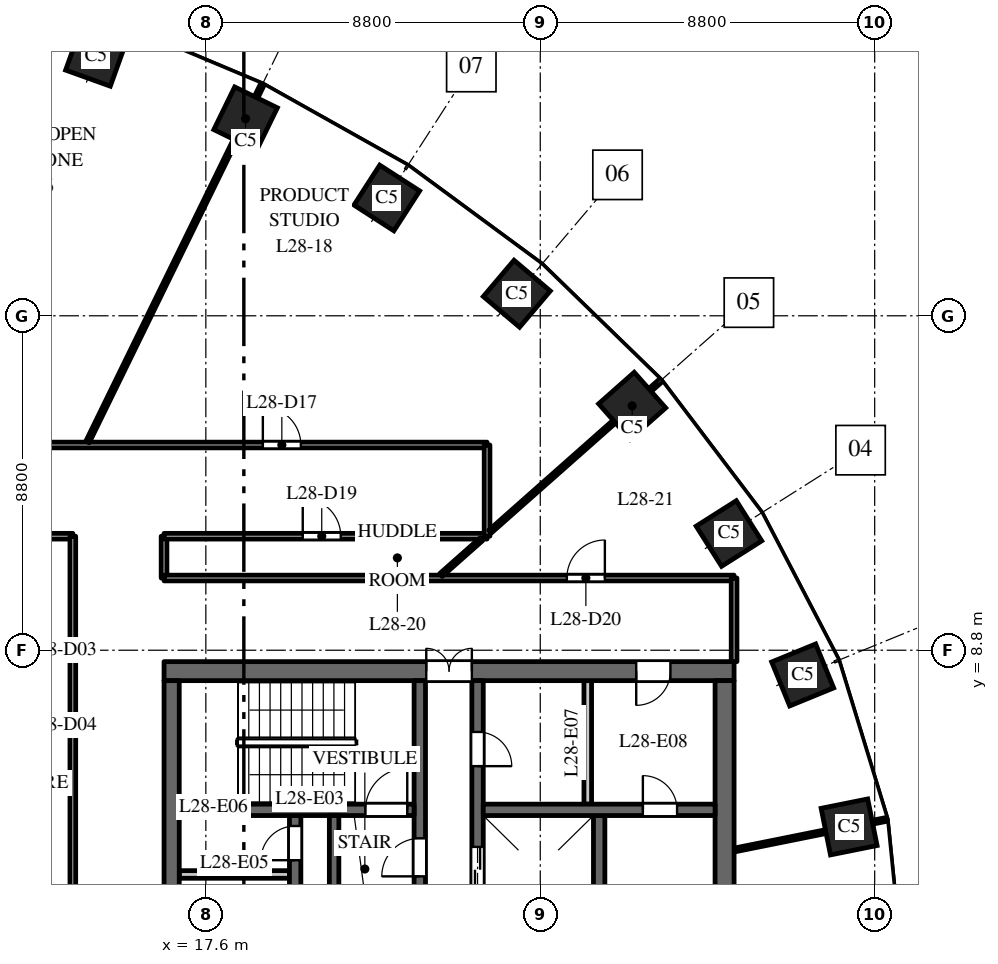
"""IFC4 building model, lengths in metres.
Left out: names, types, materials, properties, quantities, classifications, styles, units other than length and angle.
Written with IfcOpenShell. Run it as: python <this file> out.ifc"""

import sys

from ifc_helpers import new_model, si_unit, direction, frame, frame_2d, origin, origin_2d, place, context, subcontext, project, spatial, rectangle, extrude, element, fill, save


model = new_model("IFC4")
c1 = context("Model", 3, precision=1e-05, world=origin(), true_north=direction((0.0, 1.0)))
c2 = subcontext(c1, "Body", "Model", "MODEL_VIEW")
j1 = project(units=[si_unit("LENGTHUNIT", "METRE"), si_unit("PLANEANGLEUNIT", "RADIAN")], contexts=[c1])
p1 = place(None, origin())
s1 = spatial("IfcSite", under=j1, at=p1, CompositionType="ELEMENT")
p2 = place(p1, origin())
s2 = spatial("IfcBuilding", under=s1, at=p2, CompositionType="ELEMENT")
p3 = place(p2, frame((0.0, 0.0, 124.0)))
s3 = spatial("IfcBuildingStorey", under=s2, at=p3, CompositionType="ELEMENT", Elevation=124.0)
for number, where, z_axis, x_axis in (
    (1, (34.527, 4.151, 0.0), (0.0, 0.0, 1.0), (-0.197, 0.98, 0.0)),
    (2, (33.305, 8.149, 0.0), (0.0, 0.0, 1.0), (-0.379, 0.925, 0.0)),
    (3, (31.365, 11.871, 0.0), (0.0, 0.0, 1.0), (-0.535, 0.845, 0.0)),
    (4, (28.819, 15.23, 0.0), (0.0, 0.0, 1.0), (-0.663, 0.749, 0.0)),
    (5, (25.783, 18.18, 0.0), (0.0, 0.0, 1.0), (-0.763, 0.646, 0.0)),
    (6, (22.362, 20.7, 0.0), (0.0, 0.0, 1.0), (-0.84, 0.542, 0.0)),
    (7, (18.646, 22.785, 0.0), (0.0, 0.0, 1.0), (-0.898, 0.439, 0.0)),
    (8, (14.709, 24.441, 0.0), (0.0, 0.0, 1.0), (-0.941, 0.338, 0.0)),
):
    element("IfcColumn", number, at=place(p3, frame(where, z_axis=z_axis, x_axis=x_axis)), inside=s3, PredefinedType="COLUMN", context=c2, shape_type="SweptSolid", body=[
        extrude(rectangle(XDim=1.25, YDim=1.25, at=origin_2d()), origin(), (0.0, 0.0, 1.0), 4.0),
    ])
p4 = place(p3, frame((16.5, 8.25, 0.0), z_axis=(0.0, 0.0, 1.0), x_axis=(1.0, 0.0, 0.0)))
e9 = element("IfcWall", 9, at=p4, inside=s3, PredefinedType="SHEAR", context=c2, shape_type="SweptSolid", body=[
    extrude(rectangle(XDim=15.0, YDim=0.5, at=frame_2d((7.5, 0.0))), origin(), (0.0, 0.0, 1.0), 3.7),
])
p5 = place(p4, frame((6.9, 0.0, 0.0)))
e10 = element("IfcOpeningElement", 10, at=p5, cuts=e9, PredefinedType="OPENING", context=c2, shape_type="SweptSolid", body=[
    extrude(rectangle(XDim=1.2, YDim=2.1, at=frame_2d((0.6, 1.05))), frame((0.0, 0.26, 0.0), z_axis=(0.0, -1.0, 0.0), x_axis=(1.0, 0.0, 0.0)), (0.0, 0.0, 1.0), 0.52),
])
p6 = place(p4, frame((12.425, 0.0, 0.0)))
e11 = element("IfcOpeningElement", 11, at=p6, cuts=e9, PredefinedType="OPENING", context=c2, shape_type="SweptSolid", body=[
    extrude(rectangle(XDim=0.9, YDim=2.1, at=frame_2d((0.45, 1.05))), frame((0.0, 0.26, 0.0), z_axis=(0.0, -1.0, 0.0), x_axis=(1.0, 0.0, 0.0)), (0.0, 0.0, 1.0), 0.52),
])
p7 = place(p3, frame((16.9, 2.9, 0.0), z_axis=(0.0, 0.0, 1.0), x_axis=(1.0, 0.0, 0.0)))
e12 = element("IfcWall", 12, at=p7, inside=s3, PredefinedType="PARTITIONING", context=c2, shape_type="SweptSolid", body=[
    extrude(rectangle(XDim=2.9, YDim=0.2, at=frame_2d((1.45, 0.0))), origin(), (0.0, 0.0, 1.0), 3.7),
])
p8 = place(p3, frame((27.95, -4.45, 0.0), z_axis=(0.0, 0.0, 1.0), x_axis=(0.0, 1.0, 0.0)))
e13 = element("IfcWall", 13, at=p8, inside=s3, PredefinedType="SHEAR", context=c2, shape_type="SweptSolid", body=[
    extrude(rectangle(XDim=8.9, YDim=0.3, at=frame_2d((4.45, 0.0))), origin(), (0.0, 0.0, 1.0), 3.7),
])
p9 = place(p3, frame((19.95, -4.45, 0.0), z_axis=(0.0, 0.0, 1.0), x_axis=(0.0, 1.0, 0.0)))
e14 = element("IfcWall", 14, at=p9, inside=s3, PredefinedType="SHEAR", context=c2, shape_type="SweptSolid", body=[
    extrude(rectangle(XDim=8.9, YDim=0.3, at=frame_2d((4.45, 0.0))), origin(), (0.0, 0.0, 1.0), 3.7),
])
p10 = place(p9, frame((0.775, 0.0, 0.0)))
e15 = element("IfcOpeningElement", 15, at=p10, cuts=e14, PredefinedType="OPENING", context=c2, shape_type="SweptSolid", body=[
    extrude(rectangle(XDim=1.2, YDim=2.1, at=frame_2d((0.6, 1.05))), frame((0.0, 0.16, 0.0), z_axis=(0.0, -1.0, 0.0), x_axis=(1.0, 0.0, 0.0)), (0.0, 0.0, 1.0), 0.32),
])
p11 = place(p9, frame((4.62, 0.0, 0.0)))
e16 = element("IfcOpeningElement", 16, at=p11, cuts=e14, PredefinedType="OPENING", context=c2, shape_type="SweptSolid", body=[
    extrude(rectangle(XDim=0.9, YDim=2.1, at=frame_2d((0.45, 1.05))), frame((0.0, 0.16, 0.0), z_axis=(0.0, -1.0, 0.0), x_axis=(1.0, 0.0, 0.0)), (0.0, 0.0, 1.0), 0.32),
])
p12 = place(p9, frame((6.1, 0.0, 0.0)))
e17 = element("IfcOpeningElement", 17, at=p12, cuts=e14, PredefinedType="OPENING", context=c2, shape_type="SweptSolid", body=[
    extrude(rectangle(XDim=0.9, YDim=2.1, at=frame_2d((0.45, 1.05))), frame((0.0, 0.16, 0.0), z_axis=(0.0, -1.0, 0.0), x_axis=(1.0, 0.0, 0.0)), (0.0, 0.0, 1.0), 0.32),
])
p13 = place(p9, frame((7.725, 0.0, 0.0)))
e18 = element("IfcOpeningElement", 18, at=p13, cuts=e14, PredefinedType="OPENING", context=c2, shape_type="SweptSolid", body=[
    extrude(rectangle(XDim=0.9, YDim=2.1, at=frame_2d((0.45, 1.05))), frame((0.0, 0.16, 0.0), z_axis=(0.0, -1.0, 0.0), x_axis=(1.0, 0.0, 0.0)), (0.0, 0.0, 1.0), 0.32),
])
p14 = place(p3, frame((24.75, -8.0, 0.0), z_axis=(0.0, 0.0, 1.0), x_axis=(0.0, 1.0, 0.0)))
e19 = element("IfcWall", 19, at=p14, inside=s3, PredefinedType="SHEAR", context=c2, shape_type="SweptSolid", body=[
    extrude(rectangle(XDim=16.0, YDim=0.3, at=frame_2d((8.0, 0.0))), origin(), (0.0, 0.0, 1.0), 3.7),
])
p15 = place(p14, frame((4.425, 0.0, 0.0)))
e20 = element("IfcOpeningElement", 20, at=p15, cuts=e19, PredefinedType="OPENING", context=c2, shape_type="SweptSolid", body=[
    extrude(rectangle(XDim=1.1, YDim=2.1, at=frame_2d((0.55, 1.05))), frame((0.0, 0.16, 0.0), z_axis=(0.0, -1.0, 0.0), x_axis=(1.0, 0.0, 0.0)), (0.0, 0.0, 1.0), 0.32),
])
p16 = place(p14, frame((7.45, 0.0, 0.0)))
e21 = element("IfcOpeningElement", 21, at=p16, cuts=e19, PredefinedType="OPENING", context=c2, shape_type="SweptSolid", body=[
    extrude(rectangle(XDim=1.1, YDim=2.1, at=frame_2d((0.55, 1.05))), frame((0.0, 0.16, 0.0), z_axis=(0.0, -1.0, 0.0), x_axis=(1.0, 0.0, 0.0)), (0.0, 0.0, 1.0), 0.32),
])
p17 = place(p14, frame((10.425, 0.0, 0.0)))
e22 = element("IfcOpeningElement", 22, at=p17, cuts=e19, PredefinedType="OPENING", context=c2, shape_type="SweptSolid", body=[
    extrude(rectangle(XDim=1.2, YDim=2.1, at=frame_2d((0.6, 1.05))), frame((0.0, 0.16, 0.0), z_axis=(0.0, -1.0, 0.0), x_axis=(1.0, 0.0, 0.0)), (0.0, 0.0, 1.0), 0.32),
])
p18 = place(p14, frame((13.75, 0.0, 0.0)))
e23 = element("IfcOpeningElement", 23, at=p18, cuts=e19, PredefinedType="OPENING", context=c2, shape_type="SweptSolid", body=[
    extrude(rectangle(XDim=0.9, YDim=2.1, at=frame_2d((0.45, 1.05))), frame((0.0, 0.16, 0.0), z_axis=(0.0, -1.0, 0.0), x_axis=(1.0, 0.0, 0.0)), (0.0, 0.0, 1.0), 0.32),
])
p19 = place(p14, frame((1.35, 0.0, 0.0)))
e24 = element("IfcOpeningElement", 24, at=p19, cuts=e19, PredefinedType="OPENING", context=c2, shape_type="SweptSolid", body=[
    extrude(rectangle(XDim=0.9, YDim=2.1, at=frame_2d((0.45, 1.05))), frame((0.0, 0.16, 0.0), z_axis=(0.0, -1.0, 0.0), x_axis=(1.0, 0.0, 0.0)), (0.0, 0.0, 1.0), 0.32),
])
p20 = place(p3, frame((16.7, -8.0, 0.0), z_axis=(0.0, 0.0, 1.0), x_axis=(0.0, 1.0, 0.0)))
e25 = element("IfcWall", 25, at=p20, inside=s3, PredefinedType="SHEAR", context=c2, shape_type="SweptSolid", body=[
    extrude(rectangle(XDim=16.0, YDim=0.4, at=frame_2d((8.0, 0.0))), origin(), (0.0, 0.0, 1.0), 3.7),
])
p21 = place(p3, frame((31.25, -8.0, 0.0), z_axis=(0.0, 0.0, 1.0), x_axis=(0.0, 1.0, 0.0)))
e26 = element("IfcWall", 26, at=p21, inside=s3, PredefinedType="SHEAR", context=c2, shape_type="SweptSolid", body=[
    extrude(rectangle(XDim=16.0, YDim=0.5, at=frame_2d((8.0, 0.0))), origin(), (0.0, 0.0, 1.0), 3.7),
])
p22 = place(p3, frame((24.9, 4.6, 0.0), z_axis=(0.0, 0.0, 1.0), x_axis=(1.0, 0.0, 0.0)))
e27 = element("IfcWall", 27, at=p22, inside=s3, PredefinedType="SHEAR", context=c2, shape_type="SweptSolid", body=[
    extrude(rectangle(XDim=6.1, YDim=0.3, at=frame_2d((3.05, 0.0))), origin(), (0.0, 0.0, 1.0), 3.7),
])
p23 = place(p22, frame((4.2, 0.0, 0.0)))
e28 = element("IfcOpeningElement", 28, at=p23, cuts=e27, PredefinedType="OPENING", context=c2, shape_type="SweptSolid", body=[
    extrude(rectangle(XDim=0.9, YDim=2.1, at=frame_2d((0.45, 1.05))), frame((0.0, 0.16, 0.0), z_axis=(0.0, -1.0, 0.0), x_axis=(1.0, 0.0, 0.0)), (0.0, 0.0, 1.0), 0.32),
])
p24 = place(p3, frame((27.65, 4.75, 0.0), z_axis=(0.0, 0.0, 1.0), x_axis=(0.0, 1.0, 0.0)))
e29 = element("IfcWall", 29, at=p24, inside=s3, PredefinedType="PARTITIONING", context=c2, shape_type="SweptSolid", body=[
    extrude(rectangle(XDim=3.25, YDim=0.2, at=frame_2d((1.625, 0.0))), origin(), (0.0, 0.0, 1.0), 3.7),
])
p25 = place(p3, frame((23.23, 2.25, 0.0), z_axis=(0.0, 0.0, 1.0), x_axis=(0.0, 1.0, 0.0)))
e30 = element("IfcWall", 30, at=p25, inside=s3, PredefinedType="SHEAR", context=c2, shape_type="SweptSolid", body=[
    extrude(rectangle(XDim=5.75, YDim=0.3, at=frame_2d((2.875, 0.0))), origin(), (0.0, 0.0, 1.0), 3.7),
])
p26 = place(p25, frame((0.6, 0.0, 0.0)))
e31 = element("IfcOpeningElement", 31, at=p26, cuts=e30, PredefinedType="OPENING", context=c2, shape_type="SweptSolid", body=[
    extrude(rectangle(XDim=1.0, YDim=2.1, at=frame_2d((0.5, 1.05))), frame((0.0, 0.16, 0.0), z_axis=(0.0, -1.0, 0.0), x_axis=(1.0, 0.0, 0.0)), (0.0, 0.0, 1.0), 0.32),
])
p27 = place(p3, frame((16.9, 4.6, 0.0), z_axis=(0.0, 0.0, 1.0), x_axis=(1.0, 0.0, 0.0)))
e32 = element("IfcWall", 32, at=p27, inside=s3, PredefinedType="SHEAR", context=c2, shape_type="SweptSolid", body=[
    extrude(rectangle(XDim=6.18, YDim=0.3, at=frame_2d((3.09, 0.0))), origin(), (0.0, 0.0, 1.0), 3.7),
])
p28 = place(p27, frame((4.9, 0.0, 0.0)))
e33 = element("IfcOpeningElement", 33, at=p28, cuts=e32, PredefinedType="OPENING", context=c2, shape_type="SweptSolid", body=[
    extrude(rectangle(XDim=1.1, YDim=2.1, at=frame_2d((0.55, 1.05))), frame((0.0, 0.16, 0.0), z_axis=(0.0, -1.0, 0.0), x_axis=(1.0, 0.0, 0.0)), (0.0, 0.0, 1.0), 0.32),
])
p29 = place(p3, frame((20.975, 2.25, 0.0), z_axis=(0.0, 0.0, 1.0), x_axis=(0.0, 1.0, 0.0)))
e34 = element("IfcWall", 34, at=p29, inside=s3, PredefinedType="SHEAR", context=c2, shape_type="SweptSolid", body=[
    extrude(rectangle(XDim=2.2, YDim=0.25, at=frame_2d((1.1, 0.0))), origin(), (0.0, 0.0, 1.0), 3.7),
])
p30 = place(p3, frame((0.764, 14.2, 0.0), z_axis=(0.0, 0.0, 1.0), x_axis=(1.0, 0.0, 0.0)))
e35 = element("IfcWall", 35, at=p30, inside=s3, PredefinedType="PARTITIONING", context=c2, shape_type="SweptSolid", body=[
    extrude(rectangle(XDim=24.236, YDim=0.15, at=frame_2d((12.118, 0.0))), origin(), (0.0, 0.0, 1.0), 2.85),
])
p31 = place(p30, frame((6.294, 0.0, 0.0)))
e36 = element("IfcOpeningElement", 36, at=p31, cuts=e35, PredefinedType="OPENING", context=c2, shape_type="SweptSolid", body=[
    extrude(rectangle(XDim=1.0, YDim=2.1, at=frame_2d((0.5, 1.05))), frame((0.0, 0.085, 0.0), z_axis=(0.0, -1.0, 0.0), x_axis=(1.0, 0.0, 0.0)), (0.0, 0.0, 1.0), 0.17),
])
p32 = place(p30, frame((18.336, 0.0, 0.0)))
e37 = element("IfcOpeningElement", 37, at=p32, cuts=e35, PredefinedType="OPENING", context=c2, shape_type="SweptSolid", body=[
    extrude(rectangle(XDim=1.0, YDim=2.1, at=frame_2d((0.5, 1.05))), frame((0.0, 0.085, 0.0), z_axis=(0.0, -1.0, 0.0), x_axis=(1.0, 0.0, 0.0)), (0.0, 0.0, 1.0), 0.17),
])
p33 = place(p3, frame((8.93, 11.8, 0.0), z_axis=(0.0, 0.0, 1.0), x_axis=(1.0, 0.0, 0.0)))
e38 = element("IfcWall", 38, at=p33, inside=s3, PredefinedType="PARTITIONING", context=c2, shape_type="SweptSolid", body=[
    extrude(rectangle(XDim=5.17, YDim=0.15, at=frame_2d((2.585, 0.0))), origin(), (0.0, 0.0, 1.0), 3.7),
])
p34 = place(p3, frame((14.1, -11.8, 0.0), z_axis=(0.0, 0.0, 1.0), x_axis=(0.0, 1.0, 0.0)))
e39 = element("IfcWall", 39, at=p34, inside=s3, PredefinedType="PARTITIONING", context=c2, shape_type="SweptSolid", body=[
    extrude(rectangle(XDim=23.6, YDim=0.15, at=frame_2d((11.8, 0.0))), origin(), (0.0, 0.0, 1.0), 2.75),
])
p35 = place(p34, frame((11.2, 0.0, 0.0)))
e40 = element("IfcOpeningElement", 40, at=p35, cuts=e39, PredefinedType="OPENING", context=c2, shape_type="SweptSolid", body=[
    extrude(rectangle(XDim=1.0, YDim=2.1, at=frame_2d((0.5, 1.05))), frame((0.0, 0.085, 0.0), z_axis=(0.0, -1.0, 0.0), x_axis=(1.0, 0.0, 0.0)), (0.0, 0.0, 1.0), 0.17),
])
p36 = place(p3, frame((14.487, 14.279, 0.0), z_axis=(0.0, 0.0, 1.0), x_axis=(0.439239825182, 0.898369843647, 0.0)))
e41 = element("IfcWall", 41, at=p36, inside=s3, PredefinedType="PARTITIONING", context=c2, shape_type="SweptSolid", body=[
    extrude(rectangle(XDim=10.47, YDim=0.1, at=frame_2d((5.235, 0.0))), origin(), (0.0, 0.0, 1.0), 2.9),
])
p37 = place(p3, frame((16.5, 10.7, 0.0), z_axis=(0.0, 0.0, 1.0), x_axis=(0.0, 1.0, 0.0)))
e42 = element("IfcWall", 42, at=p37, inside=s3, PredefinedType="PARTITIONING", context=c2, shape_type="SweptSolid", body=[
    extrude(rectangle(XDim=1.1, YDim=0.15, at=frame_2d((0.55, 0.0))), origin(), (0.0, 0.0, 1.0), 3.7),
])
p38 = place(p3, frame((16.5, 10.7, 0.0), z_axis=(0.0, 0.0, 1.0), x_axis=(1.0, 0.0, 0.0)))
e43 = element("IfcWall", 43, at=p38, inside=s3, PredefinedType="PARTITIONING", context=c2, shape_type="SweptSolid", body=[
    extrude(rectangle(XDim=15.0, YDim=0.15, at=frame_2d((7.5, 0.0))), origin(), (0.0, 0.0, 1.0), 2.75),
])
p39 = place(p38, frame((10.6, 0.0, 0.0)))
e44 = element("IfcOpeningElement", 44, at=p39, cuts=e43, PredefinedType="OPENING", context=c2, shape_type="SweptSolid", body=[
    extrude(rectangle(XDim=1.0, YDim=2.1, at=frame_2d((0.5, 1.05))), frame((0.0, 0.085, 0.0), z_axis=(0.0, -1.0, 0.0), x_axis=(1.0, 0.0, 0.0)), (0.0, 0.0, 1.0), 0.17),
])
p40 = place(p3, frame((16.5, 11.8, 0.0), z_axis=(0.0, 0.0, 1.0), x_axis=(1.0, 0.0, 0.0)))
e45 = element("IfcWall", 45, at=p40, inside=s3, PredefinedType="PARTITIONING", context=c2, shape_type="SweptSolid", body=[
    extrude(rectangle(XDim=8.5, YDim=0.15, at=frame_2d((4.25, 0.0))), origin(), (0.0, 0.0, 1.0), 2.75),
])
p41 = place(p40, frame((3.65, 0.0, 0.0)))
e46 = element("IfcOpeningElement", 46, at=p41, cuts=e45, PredefinedType="OPENING", context=c2, shape_type="SweptSolid", body=[
    extrude(rectangle(XDim=1.0, YDim=2.1, at=frame_2d((0.5, 1.05))), frame((0.0, 0.085, 0.0), z_axis=(0.0, -1.0, 0.0), x_axis=(1.0, 0.0, 0.0)), (0.0, 0.0, 1.0), 0.17),
])
p42 = place(p3, frame((23.785, 10.778, 0.0), z_axis=(0.0, 0.0, 1.0), x_axis=(0.749052165765, 0.662511021013, 0.0)))
e47 = element("IfcWall", 47, at=p42, inside=s3, PredefinedType="PARTITIONING", context=c2, shape_type="SweptSolid", body=[
    extrude(rectangle(XDim=1.425, YDim=0.1, at=frame_2d((0.712, 0.0))), origin(), (0.0, 0.0, 1.0), 3.7),
])
p43 = place(p3, frame((25.0, 11.8, 0.0), z_axis=(0.0, 0.0, 1.0), x_axis=(0.0, 1.0, 0.0)))
e48 = element("IfcWall", 48, at=p43, inside=s3, PredefinedType="PARTITIONING", context=c2, shape_type="SweptSolid", body=[
    extrude(rectangle(XDim=2.4, YDim=0.15, at=frame_2d((1.2, 0.0))), origin(), (0.0, 0.0, 1.0), 2.75),
])
p44 = place(p3, frame((25.078, 11.921, 0.0), z_axis=(0.0, 0.0, 1.0), x_axis=(0.748903310324, 0.662679282749, 0.0)))
e49 = element("IfcWall", 49, at=p44, inside=s3, PredefinedType="PARTITIONING", context=c2, shape_type="SweptSolid", body=[
    extrude(rectangle(XDim=5.997, YDim=0.1, at=frame_2d((2.999, 0.0))), origin(), (0.0, 0.0, 1.0), 3.7),
])
p45 = place(p3, frame((31.5, 3.542, 0.0), z_axis=(0.0, 0.0, 1.0), x_axis=(0.980357474535, 0.197228857227, 0.0)))
e50 = element("IfcWall", 50, at=p45, inside=s3, PredefinedType="PARTITIONING", context=c2, shape_type="SweptSolid", body=[
    extrude(rectangle(XDim=4.092, YDim=0.1, at=frame_2d((2.046, 0.0))), origin(), (0.0, 0.0, 1.0), 2.9),
])
p46 = place(p3, frame((31.5, 8.5, 0.0), z_axis=(0.0, 0.0, 1.0), x_axis=(0.0, 1.0, 0.0)))
e51 = element("IfcWall", 51, at=p46, inside=s3, PredefinedType="PARTITIONING", context=c2, shape_type="SweptSolid", body=[
    extrude(rectangle(XDim=2.2, YDim=0.15, at=frame_2d((1.1, 0.0))), origin(), (0.0, 0.0, 1.0), 2.9),
])
p47 = place(p17, origin())
e52 = element("IfcDoor", 52, at=p47, inside=s3, OperationType="DOUBLE_DOOR_SLIDING", PredefinedType="DOOR", context=c2, shape_type="SweptSolid", body=[
    extrude(rectangle(XDim=1.2, YDim=2.1, at=frame_2d((0.6, 1.05))), frame((0.0, 0.025, 0.0), z_axis=(0.0, -1.0, 0.0), x_axis=(1.0, 0.0, 0.0)), (0.0, 0.0, 1.0), 0.05),
])
fill(e22, e52)
p48 = place(p28, origin())
e53 = element("IfcDoor", 53, at=p48, inside=s3, OperationType="SINGLE_SWING_LEFT", PredefinedType="DOOR", context=c2, shape_type="SweptSolid", body=[
    extrude(rectangle(XDim=1.1, YDim=2.1, at=frame_2d((0.55, 1.05))), frame((0.0, 0.025, 0.0), z_axis=(0.0, -1.0, 0.0), x_axis=(1.0, 0.0, 0.0)), (0.0, 0.0, 1.0), 0.05),
])
fill(e33, e53)
p49 = place(p26, origin())
e54 = element("IfcDoor", 54, at=p49, inside=s3, OperationType="SINGLE_SWING_RIGHT", PredefinedType="DOOR", context=c2, shape_type="SweptSolid", body=[
    extrude(rectangle(XDim=1.0, YDim=2.1, at=frame_2d((0.5, 1.05))), frame((0.0, 0.025, 0.0), z_axis=(0.0, -1.0, 0.0), x_axis=(1.0, 0.0, 0.0)), (0.0, 0.0, 1.0), 0.05),
])
fill(e31, e54)
p50 = place(p5, origin())
e55 = element("IfcDoor", 55, at=p50, inside=s3, OperationType="DOUBLE_DOOR_DOUBLE_SWING", PredefinedType="DOOR", context=c2, shape_type="SweptSolid", body=[
    extrude(rectangle(XDim=1.2, YDim=2.1, at=frame_2d((0.6, 1.05))), frame((0.0, 0.025, 0.0), z_axis=(0.0, -1.0, 0.0), x_axis=(1.0, 0.0, 0.0)), (0.0, 0.0, 1.0), 0.05),
])
fill(e10, e55)
p51 = place(p13, origin())
e56 = element("IfcDoor", 56, at=p51, inside=s3, OperationType="SINGLE_SWING_RIGHT", PredefinedType="DOOR", context=c2, shape_type="SweptSolid", body=[
    extrude(rectangle(XDim=0.9, YDim=2.1, at=frame_2d((0.45, 1.05))), frame((0.0, 0.025, 0.0), z_axis=(0.0, -1.0, 0.0), x_axis=(1.0, 0.0, 0.0)), (0.0, 0.0, 1.0), 0.05),
])
fill(e18, e56)
p52 = place(p18, origin())
e57 = element("IfcDoor", 57, at=p52, inside=s3, OperationType="SINGLE_SWING_LEFT", PredefinedType="DOOR", context=c2, shape_type="SweptSolid", body=[
    extrude(rectangle(XDim=0.9, YDim=2.1, at=frame_2d((0.45, 1.05))), frame((0.0, 0.025, 0.0), z_axis=(0.0, -1.0, 0.0), x_axis=(1.0, 0.0, 0.0)), (0.0, 0.0, 1.0), 0.05),
])
fill(e23, e57)
p53 = place(p6, origin())
e58 = element("IfcDoor", 58, at=p53, inside=s3, OperationType="SINGLE_SWING_LEFT", PredefinedType="DOOR", context=c2, shape_type="SweptSolid", body=[
    extrude(rectangle(XDim=0.9, YDim=2.1, at=frame_2d((0.45, 1.05))), frame((0.0, 0.025, 0.0), z_axis=(0.0, -1.0, 0.0), x_axis=(1.0, 0.0, 0.0)), (0.0, 0.0, 1.0), 0.05),
])
fill(e11, e58)
p54 = place(p23, origin())
e59 = element("IfcDoor", 59, at=p54, inside=s3, OperationType="SINGLE_SWING_RIGHT", PredefinedType="DOOR", context=c2, shape_type="SweptSolid", body=[
    extrude(rectangle(XDim=0.9, YDim=2.1, at=frame_2d((0.45, 1.05))), frame((0.0, 0.025, 0.0), z_axis=(0.0, -1.0, 0.0), x_axis=(1.0, 0.0, 0.0)), (0.0, 0.0, 1.0), 0.05),
])
fill(e28, e59)
p55 = place(p32, origin())
e60 = element("IfcDoor", 60, at=p55, inside=s3, OperationType="SINGLE_SWING_LEFT", PredefinedType="DOOR", context=c2, shape_type="SweptSolid", body=[
    extrude(rectangle(XDim=1.0, YDim=2.1, at=frame_2d((0.5, 1.05))), frame((0.0, 0.025, 0.0), z_axis=(0.0, -1.0, 0.0), x_axis=(1.0, 0.0, 0.0)), (0.0, 0.0, 1.0), 0.05),
])
fill(e37, e60)
p56 = place(p41, origin())
e61 = element("IfcDoor", 61, at=p56, inside=s3, OperationType="SINGLE_SWING_LEFT", PredefinedType="DOOR", context=c2, shape_type="SweptSolid", body=[
    extrude(rectangle(XDim=1.0, YDim=2.1, at=frame_2d((0.5, 1.05))), frame((0.0, 0.025, 0.0), z_axis=(0.0, -1.0, 0.0), x_axis=(1.0, 0.0, 0.0)), (0.0, 0.0, 1.0), 0.05),
])
fill(e46, e61)
p57 = place(p39, origin())
e62 = element("IfcDoor", 62, at=p57, inside=s3, OperationType="SINGLE_SWING_RIGHT", PredefinedType="DOOR", context=c2, shape_type="SweptSolid", body=[
    extrude(rectangle(XDim=1.0, YDim=2.1, at=frame_2d((0.5, 1.05))), frame((0.0, 0.025, 0.0), z_axis=(0.0, -1.0, 0.0), x_axis=(1.0, 0.0, 0.0)), (0.0, 0.0, 1.0), 0.05),
])
fill(e44, e62)
save(model, sys.argv[1])
